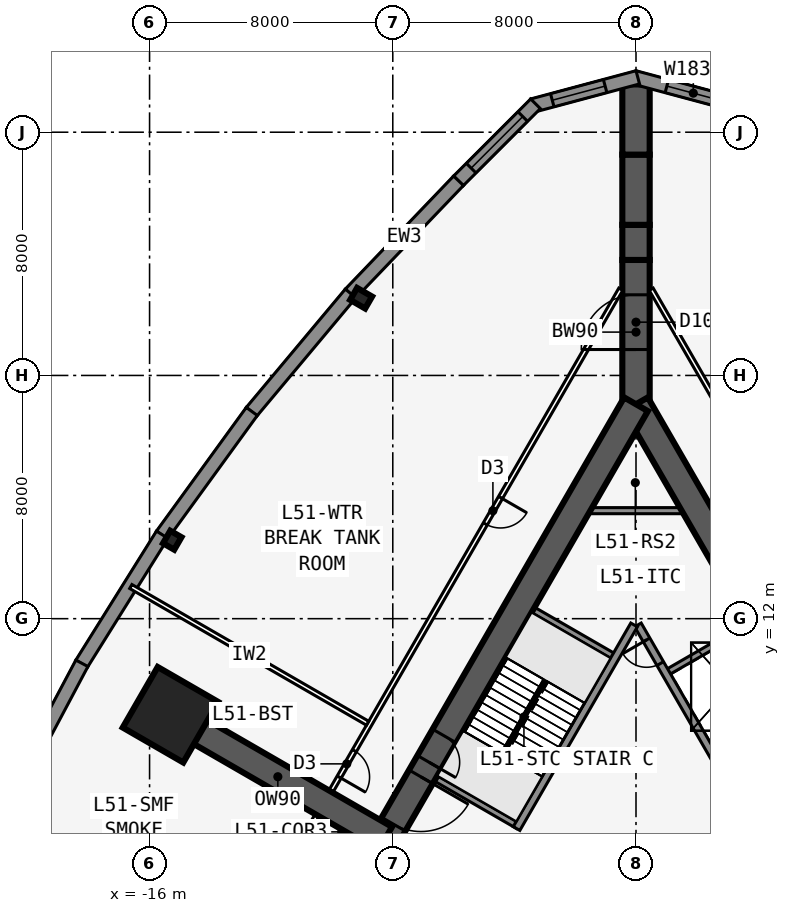
"""IFC4 building model, lengths in metres.
Left out: names, types, materials, properties, quantities, classifications, styles, units other than length and angle.
Written with IfcOpenShell. Run it as: python <this file> out.ifc"""

import sys

from ifc_helpers import new_model, si_unit, direction, frame, frame_2d, origin, origin_2d, place, context, subcontext, project, spatial, polyline, rectangle, i_section, outline, extrude, element, fill, save


model = new_model("IFC4")
c1 = context("Model", 3, precision=1e-05, world=origin(), true_north=direction((0.0, 1.0)))
c2 = subcontext(c1, "Body", "Model", "MODEL_VIEW")
j1 = project(units=[si_unit("LENGTHUNIT", "METRE"), si_unit("PLANEANGLEUNIT", "RADIAN")], contexts=[c1])
p1 = place(None, origin())
s1 = spatial("IfcSite", under=j1, at=p1, CompositionType="ELEMENT")
p2 = place(p1, origin())
s2 = spatial("IfcBuilding", under=s1, at=p2, CompositionType="ELEMENT")
p3 = place(p2, frame((0.0, 0.0, 189.5)))
s3 = spatial("IfcBuildingStorey", under=s2, at=p3, CompositionType="ELEMENT", Elevation=189.5)
p4 = place(p3, frame((8.25, 4.763, 0.0), z_axis=(0.0, 0.0, 1.0), x_axis=(-0.500002952946, 0.866023698893, 0.0)))
e1 = element("IfcWall", 1, at=p4, inside=s3, PredefinedType="SHEAR", context=c2, shape_type="SweptSolid", body=[
    extrude(rectangle(XDim=16.5, YDim=0.9, at=frame_2d((8.25, 0.0))), origin(), (0.0, 0.0, 1.0), 6.4),
])
p5 = place(p3, frame((5.379, 2.586, 0.0), z_axis=(0.0, 0.0, 1.0), x_axis=(-0.500001375892, 0.866024609411, 0.0)))
e2 = element("IfcWall", 2, at=p5, inside=s3, PredefinedType="SOLIDWALL", context=c2, shape_type="SweptSolid", body=[
    extrude(rectangle(XDim=10.633, YDim=0.25, at=frame_2d((5.316, 0.0))), origin(), (0.0, 0.0, 1.0), 6.15),
])
p6 = place(p5, frame((9.164, 0.0, 0.0)))
e3 = element("IfcOpeningElement", 3, at=p6, cuts=e2, PredefinedType="OPENING", context=c2, shape_type="SweptSolid", body=[
    extrude(rectangle(XDim=0.9, YDim=2.13, at=frame_2d((0.45, 1.065))), frame((0.0, 0.135, 0.0), z_axis=(0.0, -1.0, 0.0), x_axis=(1.0, 0.0, 0.0)), (0.0, 0.0, 1.0), 0.27),
])
for number, where, z_axis, x_axis in (
    (4, (2.429, 7.696, 0.0), (0.0, 0.0, 1.0), (0.866, 0.5, 0.0)),
    (5, (0.979, 10.207, 0.0), (0.0, 0.0, 1.0), (0.866, 0.5, 0.0)),
):
    element("IfcWall", number, at=place(p3, frame(where, z_axis=z_axis, x_axis=x_axis)), inside=s3, PredefinedType="SOLIDWALL", context=c2, shape_type="SweptSolid", body=[
        extrude(rectangle(XDim=3.125, YDim=0.2, at=frame_2d((1.562, 0.0))), origin(), (0.0, 0.0, 1.0), 6.15),
    ])
p7 = place(p3, frame((0.0, 19.052, 0.0), z_axis=(0.0, 0.0, 1.0), x_axis=(-0.500002952946, -0.866023698893, 0.0)))
e6 = element("IfcWall", 6, at=p7, inside=s3, PredefinedType="SHEAR", context=c2, shape_type="SweptSolid", body=[
    extrude(rectangle(XDim=16.5, YDim=0.9, at=frame_2d((8.25, 0.0))), origin(), (0.0, 0.0, 1.0), 6.4),
])
p8 = place(p7, frame((14.15, 0.0, 0.0)))
e7 = element("IfcOpeningElement", 7, at=p8, cuts=e6, PredefinedType="OPENING", context=c2, shape_type="SweptSolid", body=[
    extrude(rectangle(XDim=1.8, YDim=2.13, at=frame_2d((0.9, 1.065))), frame((0.0, 0.46, 0.0), z_axis=(0.0, -1.0, 0.0), x_axis=(1.0, 0.0, 0.0)), (0.0, 0.0, 1.0), 0.92),
])
p9 = place(p7, frame((12.6, 0.0, 0.0)))
e8 = element("IfcOpeningElement", 8, at=p9, cuts=e6, PredefinedType="OPENING", context=c2, shape_type="SweptSolid", body=[
    extrude(rectangle(XDim=1.0, YDim=2.13, at=frame_2d((0.5, 1.065))), frame((0.0, 0.46, 0.0), z_axis=(0.0, -1.0, 0.0), x_axis=(1.0, 0.0, 0.0)), (0.0, 0.0, 1.0), 0.92),
])
p10 = place(p3, frame((-8.25, 4.763, 0.0), z_axis=(0.0, 0.0, 1.0), x_axis=(-0.499996545922, -0.866027397988, 0.0)))
e9 = element("IfcWall", 9, at=p10, inside=s3, PredefinedType="SHEAR", context=c2, shape_type="SweptSolid", body=[
    extrude(rectangle(XDim=16.5, YDim=0.9, at=frame_2d((8.25, 0.0))), origin(), (0.0, 0.0, 1.0), 6.4),
])
p11 = place(p3, frame((-0.062, 11.794, 0.0), z_axis=(0.0, 0.0, 1.0), x_axis=(-0.500006680225, -0.86602154692, 0.0)))
e10 = element("IfcWall", 10, at=p11, inside=s3, PredefinedType="SOLIDWALL", context=c2, shape_type="SweptSolid", body=[
    extrude(rectangle(XDim=7.733, YDim=0.25, at=frame_2d((3.866, 0.0))), origin(), (0.0, 0.0, 1.0), 6.15),
])
for number, where, z_axis, x_axis in (
    (11, (-0.679, 10.727, 0.0), (0.0, 0.0, 1.0), (-0.866, 0.5, 0.0)),
    (12, (-3.879, 5.184, 0.0), (0.0, 0.0, 1.0), (-0.866, 0.5, 0.0)),
):
    element("IfcWall", number, at=place(p3, frame(where, z_axis=z_axis, x_axis=x_axis)), inside=s3, PredefinedType="SOLIDWALL", context=c2, shape_type="SweptSolid", body=[
        extrude(rectangle(XDim=3.125, YDim=0.2, at=frame_2d((1.562, 0.0))), origin(), (0.0, 0.0, 1.0), 6.15),
    ])
p12 = place(p3, frame((0.0, 19.052, 0.0), z_axis=(0.0, 0.0, 1.0), x_axis=(0.0, 1.0, 0.0)))
e13 = element("IfcWall", 13, at=p12, inside=s3, PredefinedType="SHEAR", context=c2, shape_type="SweptSolid", body=[
    extrude(rectangle(XDim=4.746, YDim=0.9, at=frame_2d((2.373, 0.0))), origin(), (0.0, 0.0, 1.0), 6.4),
])
p13 = place(p12, frame((1.8, 0.0, 0.0)))
e14 = element("IfcOpeningElement", 14, at=p13, cuts=e13, PredefinedType="OPENING", context=c2, shape_type="SweptSolid", body=[
    extrude(rectangle(XDim=1.8, YDim=2.13, at=frame_2d((0.9, 1.065))), frame((0.0, 0.46, 0.0), z_axis=(0.0, -1.0, 0.0), x_axis=(1.0, 0.0, 0.0)), (0.0, 0.0, 1.0), 0.92),
])
p14 = place(p3, frame((0.0, 23.799, 0.0), z_axis=(0.0, 0.0, 1.0), x_axis=(0.0, 1.0, 0.0)))
e15 = element("IfcWall", 15, at=p14, inside=s3, PredefinedType="SHEAR", context=c2, shape_type="SweptSolid", body=[
    extrude(rectangle(XDim=1.155, YDim=0.9, at=frame_2d((0.577, 0.0))), origin(), (0.0, 0.0, 1.0), 6.4),
])
p15 = place(p3, frame((0.0, 24.953, 0.0), z_axis=(0.0, 0.0, 1.0), x_axis=(0.0, 1.0, 0.0)))
e16 = element("IfcWall", 16, at=p15, inside=s3, PredefinedType="SHEAR", context=c2, shape_type="SweptSolid", body=[
    extrude(rectangle(XDim=2.309, YDim=0.9, at=frame_2d((1.155, 0.0))), origin(), (0.0, 0.0, 1.0), 6.4),
])
p16 = place(p3, frame((0.0, 27.263, 0.0), z_axis=(0.0, 0.0, 1.0), x_axis=(0.0, 1.0, 0.0)))
e17 = element("IfcWall", 17, at=p16, inside=s3, PredefinedType="SHEAR", context=c2, shape_type="SweptSolid", body=[
    extrude(rectangle(XDim=2.31, YDim=0.9, at=frame_2d((1.155, 0.0))), origin(), (0.0, 0.0, 1.0), 6.4),
])
p17 = place(p3, frame((-8.25, 4.763, 0.0), z_axis=(0.0, 0.0, 1.0), x_axis=(-0.866023543838, 0.500003221507, 0.0)))
e18 = element("IfcWall", 18, at=p17, inside=s3, PredefinedType="SHEAR", context=c2, shape_type="SweptSolid", body=[
    extrude(rectangle(XDim=8.154, YDim=0.9, at=frame_2d((4.077, 0.0))), origin(), (0.0, 0.0, 1.0), 6.4),
])
p18 = place(p3, frame((-9.041, 22.541, 0.0), z_axis=(0.0, 0.0, 1.0), x_axis=(-0.5, -0.866025403784, 0.0)))
e19 = element("IfcColumn", 19, at=p18, inside=s3, PredefinedType="COLUMN", context=c2, shape_type="SweptSolid", body=[
    extrude(i_section(OverallWidth=0.455, OverallDepth=0.569, WebThickness=0.078, FlangeThickness=0.125, at=origin_2d()), origin(), (0.0, 0.0, 1.0), 6.4),
])
p19 = place(p3, frame((-15.254, 14.58, 0.0), z_axis=(0.0, 0.0, 1.0), x_axis=(-0.866025403784, 0.5, 0.0)))
e20 = element("IfcColumn", 20, at=p19, inside=s3, PredefinedType="COLUMN", context=c2, shape_type="SweptSolid", body=[
    extrude(i_section(OverallWidth=0.424, OverallDepth=0.475, WebThickness=0.048, FlangeThickness=0.077, at=origin_2d()), origin(), (0.0, 0.0, 1.0), 6.4),
])
p20 = place(p3, frame((-15.312, 8.84, 0.0), z_axis=(0.0, 0.0, 1.0), x_axis=(-0.866025403784, 0.5, 0.0)))
e21 = element("IfcColumn", 21, at=p20, inside=s3, PredefinedType="COLUMN", context=c2, shape_type="SweptSolid", body=[
    extrude(rectangle(XDim=2.3, YDim=2.3, at=origin_2d()), origin(), (0.0, 0.0, 1.0), 6.4),
])
p21 = place(p3, frame((3.406, 28.877, 0.0), z_axis=(0.0, 0.0, 1.0), x_axis=(-0.965924653531, 0.258823421857, 0.0)))
e22 = element("IfcWall", 22, at=p21, inside=s3, PredefinedType="SOLIDWALL", context=c2, shape_type="SweptSolid", body=[
    extrude(outline(polyline([(3.586, 0.225), (3.527, 0.225), (3.035, 0.093), (3.0, 0.225), (0.0, 0.225), (0.0, -0.225), (3.586, -0.225), (3.586, 0.225)])), origin(), (0.0, 0.0, 1.0), 6.15),
])
p22 = place(p21, frame((0.675, 0.0, 1.2)))
e23 = element("IfcOpeningElement", 23, at=p22, cuts=e22, PredefinedType="OPENING", context=c2, shape_type="SweptSolid", body=[
    extrude(rectangle(XDim=1.8, YDim=3.6, at=frame_2d((0.9, 1.8))), frame((0.0, 0.235, 0.0), z_axis=(0.0, -1.0, 0.0), x_axis=(1.0, 0.0, 0.0)), (0.0, 0.0, 1.0), 0.47),
])
p23 = place(p3, frame((0.058, 29.805, 0.0), z_axis=(0.0, 0.0, 1.0), x_axis=(-0.965924653531, -0.258823421857, 0.0)))
e24 = element("IfcWall", 24, at=p23, inside=s3, PredefinedType="SOLIDWALL", context=c2, shape_type="SweptSolid", body=[
    extrude(outline(polyline([(3.586, 0.225), (0.586, 0.225), (0.551, 0.093), (0.06, 0.225), (0.0, 0.225), (0.0, -0.225), (3.586, -0.225), (3.586, 0.225)])), origin(), (0.0, 0.0, 1.0), 6.15),
])
p24 = place(p23, frame((1.111, 0.0, 1.2)))
e25 = element("IfcOpeningElement", 25, at=p24, cuts=e24, PredefinedType="OPENING", context=c2, shape_type="SweptSolid", body=[
    extrude(rectangle(XDim=1.8, YDim=3.6, at=frame_2d((0.9, 1.8))), frame((0.0, 0.235, 0.0), z_axis=(0.0, -1.0, 0.0), x_axis=(1.0, 0.0, 0.0)), (0.0, 0.0, 1.0), 0.47),
])
p25 = place(p3, frame((-3.305, 28.935, 0.0), z_axis=(0.0, 0.0, 1.0), x_axis=(-0.707106781187, -0.707106781187, 0.0)))
e26 = element("IfcWall", 26, at=p25, inside=s3, PredefinedType="SOLIDWALL", context=c2, shape_type="SweptSolid", body=[
    extrude(rectangle(XDim=3.586, YDim=0.45, at=frame_2d((1.793, 0.0))), origin(), (0.0, 0.0, 1.0), 6.15),
])
p26 = place(p25, frame((0.593, 0.0, 1.2)))
e27 = element("IfcOpeningElement", 27, at=p26, cuts=e26, PredefinedType="OPENING", context=c2, shape_type="SweptSolid", body=[
    extrude(rectangle(XDim=2.4, YDim=3.6, at=frame_2d((1.2, 1.8))), frame((0.0, 0.235, 0.0), z_axis=(0.0, -1.0, 0.0), x_axis=(1.0, 0.0, 0.0)), (0.0, 0.0, 1.0), 0.47),
])
p27 = place(p3, frame((-5.837, 26.403, 0.0), z_axis=(0.0, 0.0, 1.0), x_axis=(-0.691719937936, -0.722165858693, 0.0)))
e28 = element("IfcWall", 28, at=p27, inside=s3, PredefinedType="SOLIDWALL", context=c2, shape_type="SweptSolid", body=[
    extrude(outline(polyline([(0.0, 0.0), (5.148, 0.0), (5.148, 6.15), (0.0, 6.15), (0.0, 0.0)]), holes=[polyline([(4.524, 3.075), (4.458, 3.58), (4.263, 4.05), (3.953, 4.454), (3.549, 4.764), (3.079, 4.958), (2.574, 5.025), (2.069, 4.958), (1.599, 4.764), (1.195, 4.454), (0.885, 4.05), (0.69, 3.58), (0.624, 3.075), (0.69, 2.57), (0.885, 2.1), (1.195, 1.696), (1.599, 1.386), (2.069, 1.191), (2.574, 1.125), (3.079, 1.191), (3.549, 1.386), (3.953, 1.696), (4.263, 2.1), (4.458, 2.57), (4.524, 3.075)])]), frame((0.0, 0.225, 0.0), z_axis=(0.0, -1.0, 0.0), x_axis=(1.0, 0.0, 0.0)), (0.0, 0.0, 1.0), 0.45),
])
p28 = place(p3, frame((-9.388, 22.696, 0.0), z_axis=(0.0, 0.0, 1.0), x_axis=(-0.641810386606, -0.766863369607, 0.0)))
e29 = element("IfcWall", 29, at=p28, inside=s3, PredefinedType="SOLIDWALL", context=c2, shape_type="SweptSolid", body=[
    extrude(outline(polyline([(0.0, 0.0), (5.076, 0.0), (5.076, 6.15), (0.0, 6.15), (0.0, 0.0)]), holes=[polyline([(4.438, 3.075), (4.373, 3.567), (4.183, 4.025), (3.882, 4.418), (3.488, 4.72), (3.03, 4.91), (2.538, 4.975), (2.046, 4.91), (1.588, 4.72), (1.195, 4.418), (0.893, 4.025), (0.703, 3.567), (0.638, 3.075), (0.703, 2.583), (0.893, 2.125), (1.195, 1.731), (1.588, 1.43), (2.046, 1.24), (2.538, 1.175), (3.03, 1.24), (3.488, 1.43), (3.882, 1.731), (4.183, 2.125), (4.373, 2.583), (4.438, 3.075)])]), frame((0.0, 0.225, 0.0), z_axis=(0.0, -1.0, 0.0), x_axis=(1.0, 0.0, 0.0)), (0.0, 0.0, 1.0), 0.45),
])
p29 = place(p3, frame((-12.637, 18.816, 0.0), z_axis=(0.0, 0.0, 1.0), x_axis=(-0.587692278424, -0.809084535682, 0.0)))
e30 = element("IfcWall", 30, at=p29, inside=s3, PredefinedType="SOLIDWALL", context=c2, shape_type="SweptSolid", body=[
    extrude(outline(polyline([(0.0, 0.0), (5.027, 0.0), (5.027, 6.15), (0.0, 6.15), (0.0, 0.0)]), holes=[polyline([(4.414, 3.075), (4.349, 3.567), (4.159, 4.025), (3.857, 4.418), (3.464, 4.72), (3.006, 4.91), (2.514, 4.975), (2.022, 4.91), (1.564, 4.72), (1.17, 4.418), (0.868, 4.025), (0.678, 3.567), (0.614, 3.075), (0.678, 2.583), (0.868, 2.125), (1.17, 1.731), (1.564, 1.43), (2.022, 1.24), (2.514, 1.175), (3.006, 1.24), (3.464, 1.43), (3.857, 1.731), (4.159, 2.125), (4.349, 2.583), (4.414, 3.075)])]), frame((0.0, 0.225, 0.0), z_axis=(0.0, -1.0, 0.0), x_axis=(1.0, 0.0, 0.0)), (0.0, 0.0, 1.0), 0.45),
])
p30 = place(p3, frame((-15.583, 14.761, 0.0), z_axis=(0.0, 0.0, 1.0), x_axis=(-0.529990167382, -0.84800378683, 0.0)))
e31 = element("IfcWall", 31, at=p30, inside=s3, PredefinedType="SOLIDWALL", context=c2, shape_type="SweptSolid", body=[
    extrude(outline(polyline([(0.0, 0.0), (5.003, 0.0), (5.003, 6.15), (0.0, 6.15), (0.0, 0.0)]), holes=[polyline([(4.402, 3.075), (4.337, 3.567), (4.147, 4.025), (3.845, 4.418), (3.451, 4.72), (2.993, 4.91), (2.501, 4.975), (2.01, 4.91), (1.552, 4.72), (1.158, 4.418), (0.856, 4.025), (0.666, 3.567), (0.602, 3.075), (0.666, 2.583), (0.856, 2.125), (1.158, 1.731), (1.552, 1.43), (2.01, 1.24), (2.501, 1.175), (2.993, 1.24), (3.451, 1.43), (3.845, 1.731), (4.147, 2.125), (4.337, 2.583), (4.402, 3.075)])]), frame((0.0, 0.225, 0.0), z_axis=(0.0, -1.0, 0.0), x_axis=(1.0, 0.0, 0.0)), (0.0, 0.0, 1.0), 0.45),
])
p31 = place(p3, frame((-18.226, 10.532, 0.0), z_axis=(0.0, 0.0, 1.0), x_axis=(-0.469404966864, -0.882982999317, 0.0)))
e32 = element("IfcWall", 32, at=p31, inside=s3, PredefinedType="SOLIDWALL", context=c2, shape_type="SweptSolid", body=[
    extrude(outline(polyline([(0.0, 0.0), (5.003, 0.0), (5.003, 6.15), (0.0, 6.15), (0.0, 0.0)]), holes=[polyline([(4.402, 3.075), (4.337, 3.567), (4.147, 4.025), (3.845, 4.418), (3.451, 4.72), (2.993, 4.91), (2.501, 4.975), (2.01, 4.91), (1.552, 4.72), (1.158, 4.418), (0.856, 4.025), (0.666, 3.567), (0.602, 3.075), (0.666, 2.583), (0.856, 2.125), (1.158, 1.731), (1.552, 1.43), (2.01, 1.24), (2.501, 1.175), (2.993, 1.24), (3.451, 1.43), (3.845, 1.731), (4.147, 2.125), (4.337, 2.583), (4.402, 3.075)])]), frame((0.0, 0.225, 0.0), z_axis=(0.0, -1.0, 0.0), x_axis=(1.0, 0.0, 0.0)), (0.0, 0.0, 1.0), 0.45),
])
p32 = place(p3, frame((20.027, -10.985, 0.0), z_axis=(0.0, 0.0, 1.0), x_axis=(-0.500001677587, 0.866024435227, 0.0)))
e33 = element("IfcWall", 33, at=p32, inside=s3, PredefinedType="PARTITIONING", context=c2, shape_type="SweptSolid", body=[
    extrude(rectangle(XDim=39.054, YDim=0.15, at=frame_2d((19.527, 0.0))), origin(), (0.0, 0.0, 1.0), 6.15),
])
p33 = place(p32, frame((5.914, 0.0, 0.0)))
e34 = element("IfcOpeningElement", 34, at=p33, cuts=e33, PredefinedType="OPENING", context=c2, shape_type="SweptSolid", body=[
    extrude(rectangle(XDim=1.0, YDim=2.13, at=frame_2d((0.5, 1.065))), frame((0.0, 0.085, 0.0), z_axis=(0.0, -1.0, 0.0), x_axis=(1.0, 0.0, 0.0)), (0.0, 0.0, 1.0), 0.17),
])
p34 = place(p32, frame((15.527, 0.0, 0.0)))
e35 = element("IfcOpeningElement", 35, at=p34, cuts=e33, PredefinedType="OPENING", context=c2, shape_type="SweptSolid", body=[
    extrude(rectangle(XDim=1.0, YDim=2.13, at=frame_2d((0.5, 1.065))), frame((0.0, 0.085, 0.0), z_axis=(0.0, -1.0, 0.0), x_axis=(1.0, 0.0, 0.0)), (0.0, 0.0, 1.0), 0.17),
])
p35 = place(p32, frame((22.027, 0.0, 0.0)))
e36 = element("IfcOpeningElement", 36, at=p35, cuts=e33, PredefinedType="OPENING", context=c2, shape_type="SweptSolid", body=[
    extrude(rectangle(XDim=1.0, YDim=2.13, at=frame_2d((0.5, 1.065))), frame((0.0, 0.085, 0.0), z_axis=(0.0, -1.0, 0.0), x_axis=(1.0, 0.0, 0.0)), (0.0, 0.0, 1.0), 0.17),
])
p36 = place(p32, frame((31.64, 0.0, 0.0)))
e37 = element("IfcOpeningElement", 37, at=p36, cuts=e33, PredefinedType="OPENING", context=c2, shape_type="SweptSolid", body=[
    extrude(rectangle(XDim=1.0, YDim=2.13, at=frame_2d((0.5, 1.065))), frame((0.0, 0.085, 0.0), z_axis=(0.0, -1.0, 0.0), x_axis=(1.0, 0.0, 0.0)), (0.0, 0.0, 1.0), 0.17),
])
p37 = place(p3, frame((-0.5, 22.836, 0.0), z_axis=(0.0, 0.0, 1.0), x_axis=(-0.500001677587, -0.866024435227, 0.0)))
e38 = element("IfcWall", 38, at=p37, inside=s3, PredefinedType="PARTITIONING", context=c2, shape_type="SweptSolid", body=[
    extrude(rectangle(XDim=39.054, YDim=0.15, at=frame_2d((19.527, 0.0))), origin(), (0.0, 0.0, 1.0), 6.15),
])
p38 = place(p37, frame((7.914, 0.0, 0.0)))
e39 = element("IfcOpeningElement", 39, at=p38, cuts=e38, PredefinedType="OPENING", context=c2, shape_type="SweptSolid", body=[
    extrude(rectangle(XDim=1.0, YDim=2.13, at=frame_2d((0.5, 1.065))), frame((0.0, 0.085, 0.0), z_axis=(0.0, -1.0, 0.0), x_axis=(1.0, 0.0, 0.0)), (0.0, 0.0, 1.0), 0.17),
])
p39 = place(p37, frame((17.527, 0.0, 0.0)))
e40 = element("IfcOpeningElement", 40, at=p39, cuts=e38, PredefinedType="OPENING", context=c2, shape_type="SweptSolid", body=[
    extrude(rectangle(XDim=1.0, YDim=2.13, at=frame_2d((0.5, 1.065))), frame((0.0, 0.085, 0.0), z_axis=(0.0, -1.0, 0.0), x_axis=(1.0, 0.0, 0.0)), (0.0, 0.0, 1.0), 0.17),
])
p40 = place(p37, frame((28.64, 0.0, 0.0)))
e41 = element("IfcOpeningElement", 41, at=p40, cuts=e38, PredefinedType="OPENING", context=c2, shape_type="SweptSolid", body=[
    extrude(rectangle(XDim=1.0, YDim=2.13, at=frame_2d((0.5, 1.065))), frame((0.0, 0.085, 0.0), z_axis=(0.0, -1.0, 0.0), x_axis=(1.0, 0.0, 0.0)), (0.0, 0.0, 1.0), 0.17),
])
p41 = place(p3, frame((-8.829, 8.561, 0.0), z_axis=(0.0, 0.0, 1.0), x_axis=(-0.866021034389, 0.500007567939, 0.0)))
e42 = element("IfcWall", 42, at=p41, inside=s3, PredefinedType="PARTITIONING", context=c2, shape_type="SweptSolid", body=[
    extrude(rectangle(XDim=8.993, YDim=0.15, at=frame_2d((4.497, 0.0))), origin(), (0.0, 0.0, 1.0), 6.15),
])
p42 = place(p3, frame((-1.501, 15.552, 0.0), z_axis=(0.0, 0.0, 1.0), x_axis=(1.0, 0.0, 0.0)))
e43 = element("IfcWall", 43, at=p42, inside=s3, PredefinedType="SOLIDWALL", context=c2, shape_type="SweptSolid", body=[
    extrude(rectangle(XDim=3.002, YDim=0.2, at=frame_2d((1.501, 0.0))), origin(), (0.0, 0.0, 1.0), 6.15),
])
p43 = place(p3, frame((-2.988, 9.978, 0.0), z_axis=(0.0, 0.0, 1.0), x_axis=(-0.499992232847, -0.866029888106, 0.0)))
e44 = element("IfcWall", 44, at=p43, inside=s3, PredefinedType="SOLIDWALL", context=c2, shape_type="SweptSolid", body=[
    extrude(rectangle(XDim=2.794, YDim=0.1, at=frame_2d((1.397, 0.0))), origin(), (0.0, 0.0, 1.0), 6.4),
])
p44 = place(p22, origin())
e45 = element("IfcWindow", 45, at=p44, inside=s3, PartitioningType="SINGLE_PANEL", PredefinedType="WINDOW", context=c2, shape_type="SweptSolid", body=[
    extrude(rectangle(XDim=1.8, YDim=3.6, at=frame_2d((0.9, 1.8))), frame((0.0, 0.03, 0.0), z_axis=(0.0, -1.0, 0.0), x_axis=(1.0, 0.0, 0.0)), (0.0, 0.0, 1.0), 0.06),
])
fill(e23, e45)
p45 = place(p24, origin())
e46 = element("IfcWindow", 46, at=p45, inside=s3, PartitioningType="SINGLE_PANEL", PredefinedType="WINDOW", context=c2, shape_type="SweptSolid", body=[
    extrude(rectangle(XDim=1.8, YDim=3.6, at=frame_2d((0.9, 1.8))), frame((0.0, 0.03, 0.0), z_axis=(0.0, -1.0, 0.0), x_axis=(1.0, 0.0, 0.0)), (0.0, 0.0, 1.0), 0.06),
])
fill(e25, e46)
p46 = place(p26, origin())
e47 = element("IfcWindow", 47, at=p46, inside=s3, PartitioningType="SINGLE_PANEL", PredefinedType="WINDOW", context=c2, shape_type="SweptSolid", body=[
    extrude(rectangle(XDim=2.4, YDim=3.6, at=frame_2d((1.2, 1.8))), frame((0.0, 0.03, 0.0), z_axis=(0.0, -1.0, 0.0), x_axis=(1.0, 0.0, 0.0)), (0.0, 0.0, 1.0), 0.06),
])
fill(e27, e47)
p47 = place(p38, origin())
e48 = element("IfcDoor", 48, at=p47, inside=s3, OperationType="SINGLE_SWING_LEFT", PredefinedType="DOOR", context=c2, shape_type="SweptSolid", body=[
    extrude(rectangle(XDim=1.0, YDim=2.13, at=frame_2d((0.5, 1.065))), frame((0.0, 0.025, 0.0), z_axis=(0.0, -1.0, 0.0), x_axis=(1.0, 0.0, 0.0)), (0.0, 0.0, 1.0), 0.05),
])
fill(e39, e48)
p48 = place(p39, origin())
e49 = element("IfcDoor", 49, at=p48, inside=s3, OperationType="SINGLE_SWING_RIGHT", PredefinedType="DOOR", context=c2, shape_type="SweptSolid", body=[
    extrude(rectangle(XDim=1.0, YDim=2.13, at=frame_2d((0.5, 1.065))), frame((0.0, 0.025, 0.0), z_axis=(0.0, -1.0, 0.0), x_axis=(1.0, 0.0, 0.0)), (0.0, 0.0, 1.0), 0.05),
])
fill(e40, e49)
p49 = place(p8, origin())
e50 = element("IfcDoor", 50, at=p49, inside=s3, OperationType="DOUBLE_DOOR_SINGLE_SWING", PredefinedType="DOOR", context=c2, shape_type="SweptSolid", body=[
    extrude(rectangle(XDim=1.8, YDim=2.13, at=frame_2d((0.9, 1.065))), frame((0.0, 0.025, 0.0), z_axis=(0.0, -1.0, 0.0), x_axis=(1.0, 0.0, 0.0)), (0.0, 0.0, 1.0), 0.05),
])
fill(e7, e50)
p50 = place(p9, origin())
e51 = element("IfcDoor", 51, at=p50, inside=s3, OperationType="SINGLE_SWING_RIGHT", PredefinedType="DOOR", context=c2, shape_type="SweptSolid", body=[
    extrude(rectangle(XDim=1.0, YDim=2.13, at=frame_2d((0.5, 1.065))), frame((0.0, 0.025, 0.0), z_axis=(0.0, -1.0, 0.0), x_axis=(1.0, 0.0, 0.0)), (0.0, 0.0, 1.0), 0.05),
])
fill(e8, e51)
p51 = place(p13, origin())
e52 = element("IfcDoor", 52, at=p51, inside=s3, OperationType="DOUBLE_DOOR_DOUBLE_SWING", PredefinedType="DOOR", context=c2, shape_type="SweptSolid", body=[
    extrude(rectangle(XDim=1.8, YDim=2.13, at=frame_2d((0.9, 1.065))), frame((0.0, 0.025, 0.0), z_axis=(0.0, -1.0, 0.0), x_axis=(1.0, 0.0, 0.0)), (0.0, 0.0, 1.0), 0.05),
])
fill(e14, e52)
p52 = place(p6, origin())
e53 = element("IfcDoor", 53, at=p52, inside=s3, OperationType="SINGLE_SWING_RIGHT", PredefinedType="DOOR", context=c2, shape_type="SweptSolid", body=[
    extrude(rectangle(XDim=0.9, YDim=2.13, at=frame_2d((0.45, 1.065))), frame((0.0, 0.025, 0.0), z_axis=(0.0, -1.0, 0.0), x_axis=(1.0, 0.0, 0.0)), (0.0, 0.0, 1.0), 0.05),
])
fill(e3, e53)
save(model, sys.argv[1])
